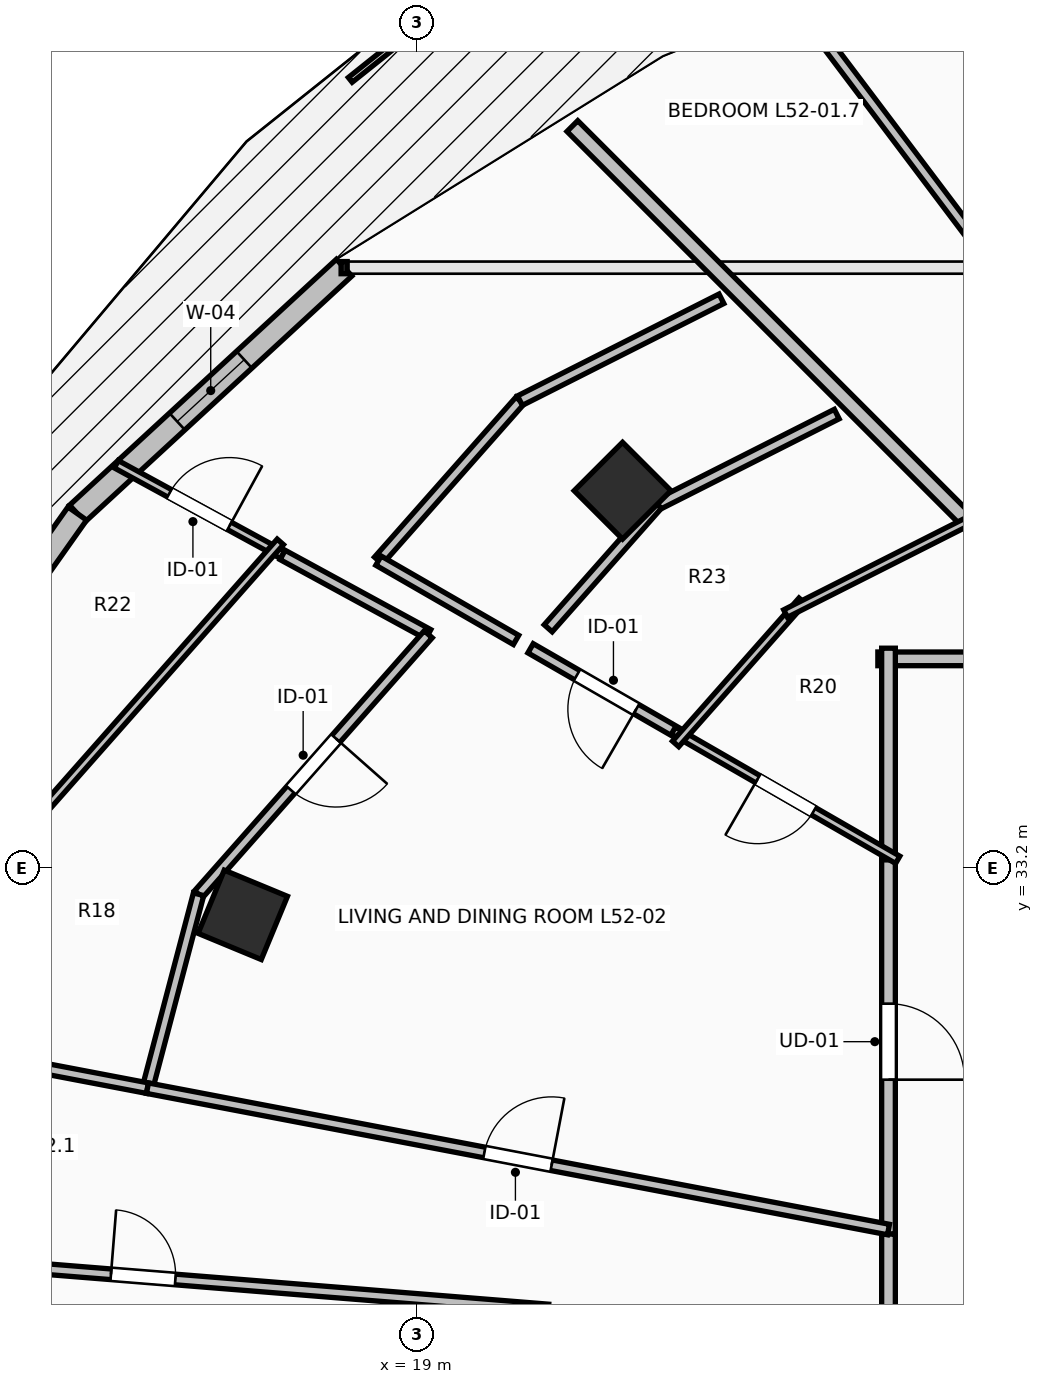
"""IFC4 building model, lengths in metres.
Left out: names, types, materials, properties, quantities, classifications, styles, units other than length and angle.
Written with IfcOpenShell. Run it as: python <this file> out.ifc"""

import sys

from ifc_helpers import new_model, si_unit, direction, frame, frame_2d, origin, origin_2d, place, context, subcontext, project, spatial, rectangle, extrude, element, fill, save


model = new_model("IFC4")
c1 = context("Model", 3, precision=1e-05, world=origin(), true_north=direction((0.0, 1.0)))
c2 = subcontext(c1, "Body", "Model", "MODEL_VIEW")
j1 = project(units=[si_unit("LENGTHUNIT", "METRE"), si_unit("PLANEANGLEUNIT", "RADIAN")], contexts=[c1])
p1 = place(None, origin())
s1 = spatial("IfcSite", under=j1, at=p1, CompositionType="ELEMENT")
p2 = place(p1, origin())
s2 = spatial("IfcBuilding", under=s1, at=p2, CompositionType="ELEMENT")
p3 = place(p2, frame((0.0, 0.0, 193.1)))
s3 = spatial("IfcBuildingStorey", under=s2, at=p3, CompositionType="ELEMENT", Elevation=193.1)
for number, where, z_axis, x_axis in (
    (1, (21.701, 38.162, 0.0), (0.0, 0.0, 1.0), (-0.707, 0.707, 0.0)),
    (2, (16.705, 32.582, 0.0), (0.0, 0.0, 1.0), (-0.924, 0.383, 0.0)),
):
    element("IfcColumn", number, at=place(p3, frame(where, z_axis=z_axis, x_axis=x_axis)), inside=s3, PredefinedType="COLUMN", context=c2, shape_type="SweptSolid", body=[
        extrude(rectangle(XDim=0.9, YDim=0.9, at=origin_2d()), origin(), (0.0, 0.0, 1.0), 3.5),
    ])
p4 = place(p3, frame((18.038, 41.097, 0.0), z_axis=(0.0, 0.0, 1.0), x_axis=(-0.735359993374, -0.677676678177, 0.0)))
e3 = element("IfcWall", 3, at=p4, inside=s3, PredefinedType="STANDARD", context=c2, shape_type="SweptSolid", body=[
    extrude(rectangle(XDim=4.774, YDim=0.3, at=frame_2d((2.387, 0.0))), origin(), (0.0, 0.0, 1.0), 3.24),
])
p5 = place(p4, frame((1.787, 0.0, 0.85)))
e4 = element("IfcOpeningElement", 4, at=p5, cuts=e3, PredefinedType="OPENING", context=c2, shape_type="SweptSolid", body=[
    extrude(rectangle(XDim=1.2, YDim=2.1, at=frame_2d((0.6, 1.05))), frame((0.0, 0.165, 0.0), z_axis=(0.0, -1.0, 0.0), x_axis=(1.0, 0.0, 0.0)), (0.0, 0.0, 1.0), 0.33),
])
p6 = place(p3, frame((14.528, 37.861, 0.0), z_axis=(0.0, 0.0, 1.0), x_axis=(-0.577168747264, -0.81662490605, 0.0)))
e5 = element("IfcWall", 5, at=p6, inside=s3, PredefinedType="STANDARD", context=c2, shape_type="SweptSolid", body=[
    extrude(rectangle(XDim=4.52, YDim=0.3, at=frame_2d((2.26, 0.0))), origin(), (0.0, 0.0, 1.0), 3.24),
])
p7 = place(p6, frame((1.46, 0.0, 0.0)))
e6 = element("IfcOpeningElement", 6, at=p7, cuts=e5, PredefinedType="OPENING", context=c2, shape_type="SweptSolid", body=[
    extrude(rectangle(XDim=1.6, YDim=2.3, at=frame_2d((0.8, 1.15))), frame((0.0, 0.165, 0.0), z_axis=(0.0, -1.0, 0.0), x_axis=(1.0, 0.0, 0.0)), (0.0, 0.0, 1.0), 0.33),
])
p8 = place(p3, frame((25.2, 33.445, 0.0), z_axis=(0.0, 0.0, 1.0), x_axis=(0.0, -1.0, 0.0)))
e7 = element("IfcWall", 7, at=p8, inside=s3, PredefinedType="PARTITIONING", context=c2, shape_type="SweptSolid", body=[
    extrude(rectangle(XDim=5.063, YDim=0.18, at=frame_2d((2.531, 0.0))), origin(), (0.0, 0.0, 1.0), 2.432),
])
p9 = place(p8, frame((2.031, 0.0, 0.0)))
e8 = element("IfcOpeningElement", 8, at=p9, cuts=e7, PredefinedType="OPENING", context=c2, shape_type="SweptSolid", body=[
    extrude(rectangle(XDim=1.0, YDim=2.15, at=frame_2d((0.5, 1.075))), frame((0.0, 0.105, 0.0), z_axis=(0.0, -1.0, 0.0), x_axis=(1.0, 0.0, 0.0)), (0.0, 0.0, 1.0), 0.21),
])
p10 = place(p3, frame((28.105, 35.95, 0.0), z_axis=(0.0, 0.0, 1.0), x_axis=(-1.0, 0.0, 0.0)))
e9 = element("IfcWall", 9, at=p10, inside=s3, PredefinedType="PARTITIONING", context=c2, shape_type="SweptSolid", body=[
    extrude(rectangle(XDim=3.045, YDim=0.18, at=frame_2d((1.522, 0.0))), origin(), (0.0, 0.0, 1.0), 2.432),
])
p11 = place(p3, frame((25.2, 36.09, 0.0), z_axis=(0.0, 0.0, 1.0), x_axis=(0.0, -1.0, 0.0)))
e10 = element("IfcWall", 10, at=p11, inside=s3, PredefinedType="PARTITIONING", context=c2, shape_type="SweptSolid", body=[
    extrude(rectangle(XDim=2.785, YDim=0.18, at=frame_2d((1.393, 0.0))), origin(), (0.0, 0.0, 1.0), 2.432),
])
p12 = place(p3, frame((25.2, 28.382, 0.0), z_axis=(0.0, 0.0, 1.0), x_axis=(0.0, -1.0, 0.0)))
e11 = element("IfcWall", 11, at=p12, inside=s3, PredefinedType="PARTITIONING", context=c2, shape_type="SweptSolid", body=[
    extrude(rectangle(XDim=1.132, YDim=0.18, at=frame_2d((0.566, 0.0))), origin(), (0.0, 0.0, 1.0), 2.432),
])
p13 = place(p3, frame((24.075, 44.46, 0.0), z_axis=(0.0, 0.0, 1.0), x_axis=(0.602185523072, -0.798356183544, 0.0)))
e12 = element("IfcWall", 12, at=p13, inside=s3, PredefinedType="PARTITIONING", context=c2, shape_type="SweptSolid", body=[
    extrude(rectangle(XDim=10.659, YDim=0.14, at=frame_2d((5.33, 0.0))), origin(), (0.0, 0.0, 1.0), 2.432),
])
p14 = place(p3, frame((21.041, 42.959, 0.0), z_axis=(0.0, 0.0, 1.0), x_axis=(0.707106781187, -0.707106781187, 0.0)))
e13 = element("IfcWall", 13, at=p14, inside=s3, PredefinedType="PARTITIONING", context=c2, shape_type="SweptSolid", body=[
    extrude(rectangle(XDim=9.912, YDim=0.2, at=frame_2d((4.956, 0.0))), origin(), (0.0, 0.0, 1.0), 2.432),
])
p15 = place(p3, frame((22.492, 34.936, 0.0), z_axis=(0.0, 0.0, 1.0), x_axis=(-0.866435390844, 0.499289208267, 0.0)))
e14 = element("IfcWall", 14, at=p15, inside=s3, PredefinedType="PARTITIONING", context=c2, shape_type="SweptSolid", body=[
    extrude(rectangle(XDim=2.309, YDim=0.14, at=frame_2d((1.155, 0.0))), origin(), (0.0, 0.0, 1.0), 2.922),
])
p16 = place(p15, frame((0.705, 0.0, 0.0)))
e15 = element("IfcOpeningElement", 15, at=p16, cuts=e14, PredefinedType="OPENING", context=c2, shape_type="SweptSolid", body=[
    extrude(rectangle(XDim=0.9, YDim=2.1, at=frame_2d((0.45, 1.05))), frame((0.0, 0.085, 0.0), z_axis=(0.0, -1.0, 0.0), x_axis=(1.0, 0.0, 0.0)), (0.0, 0.0, 1.0), 0.17),
])
p17 = place(p3, frame((25.321, 33.306, 0.0), z_axis=(0.0, 0.0, 1.0), x_axis=(-0.866517217622, 0.49914718427, 0.0)))
e16 = element("IfcWall", 16, at=p17, inside=s3, PredefinedType="PARTITIONING", context=c2, shape_type="SweptSolid", body=[
    extrude(rectangle(XDim=3.405, YDim=0.11, at=frame_2d((1.703, 0.0))), origin(), (0.0, 0.0, 1.0), 2.922),
])
p18 = place(p17, frame((1.278, 0.0, 0.0)))
e17 = element("IfcOpeningElement", 17, at=p18, cuts=e16, PredefinedType="OPENING", context=c2, shape_type="SweptSolid", body=[
    extrude(rectangle(XDim=0.85, YDim=2.1, at=frame_2d((0.425, 1.05))), frame((0.0, 0.07, 0.0), z_axis=(0.0, -1.0, 0.0), x_axis=(1.0, 0.0, 0.0)), (0.0, 0.0, 1.0), 0.14),
])
p19 = place(p3, frame((15.041, 38.51, 0.0), z_axis=(0.0, 0.0, 1.0), x_axis=(0.877951724479, -0.478749171784, 0.0)))
e18 = element("IfcWall", 18, at=p19, inside=s3, PredefinedType="PARTITIONING", context=c2, shape_type="SweptSolid", body=[
    extrude(rectangle(XDim=2.492, YDim=0.11, at=frame_2d((1.246, 0.0))), origin(), (0.0, 0.0, 1.0), 3.24),
])
p20 = place(p19, frame((0.796, 0.0, 0.0)))
e19 = element("IfcOpeningElement", 19, at=p20, cuts=e18, PredefinedType="OPENING", context=c2, shape_type="SweptSolid", body=[
    extrude(rectangle(XDim=0.9, YDim=2.1, at=frame_2d((0.45, 1.05))), frame((0.0, 0.07, 0.0), z_axis=(0.0, -1.0, 0.0), x_axis=(1.0, 0.0, 0.0)), (0.0, 0.0, 1.0), 0.14),
])
p21 = place(p3, frame((17.229, 37.317, 0.0), z_axis=(0.0, 0.0, 1.0), x_axis=(0.878117834212, -0.47844442649, 0.0)))
e20 = element("IfcWall", 20, at=p21, inside=s3, PredefinedType="PARTITIONING", context=c2, shape_type="SweptSolid", body=[
    extrude(rectangle(XDim=2.182, YDim=0.14, at=frame_2d((1.091, 0.0))), origin(), (0.0, 0.0, 1.0), 3.24),
])
p22 = place(p3, frame((19.145, 36.273, 0.0), z_axis=(0.0, 0.0, 1.0), x_axis=(-0.662162868769, -0.749359950373, 0.0)))
e21 = element("IfcWall", 21, at=p22, inside=s3, PredefinedType="PARTITIONING", context=c2, shape_type="SweptSolid", body=[
    extrude(rectangle(XDim=4.564, YDim=0.14, at=frame_2d((2.282, 0.0))), origin(), (0.0, 0.0, 1.0), 3.24),
])
p23 = place(p22, frame((1.832, 0.0, 0.0)))
e22 = element("IfcOpeningElement", 22, at=p23, cuts=e21, PredefinedType="OPENING", context=c2, shape_type="SweptSolid", body=[
    extrude(rectangle(XDim=0.9, YDim=2.1, at=frame_2d((0.45, 1.05))), frame((0.0, 0.085, 0.0), z_axis=(0.0, -1.0, 0.0), x_axis=(1.0, 0.0, 0.0)), (0.0, 0.0, 1.0), 0.17),
])
p24 = place(p3, frame((16.123, 32.853, 0.0), z_axis=(0.0, 0.0, 1.0), x_axis=(-0.254775717765, -0.967000172512, 0.0)))
e23 = element("IfcWall", 23, at=p24, inside=s3, PredefinedType="PARTITIONING", context=c2, shape_type="SweptSolid", body=[
    extrude(rectangle(XDim=2.638, YDim=0.14, at=frame_2d((1.319, 0.0))), origin(), (0.0, 0.0, 1.0), 3.24),
])
p25 = place(p3, frame((15.451, 30.302, 0.0), z_axis=(0.0, 0.0, 1.0), x_axis=(-0.982295439063, 0.187338384738, 0.0)))
e24 = element("IfcWall", 24, at=p25, inside=s3, PredefinedType="PARTITIONING", context=c2, shape_type="SweptSolid", body=[
    extrude(rectangle(XDim=2.281, YDim=0.14, at=frame_2d((1.14, 0.0))), origin(), (0.0, 0.0, 1.0), 3.24),
])
p26 = place(p3, frame((15.451, 30.302, 0.0), z_axis=(0.0, 0.0, 1.0), x_axis=(0.982284698783, -0.187394691859, 0.0)))
e25 = element("IfcWall", 25, at=p26, inside=s3, PredefinedType="PARTITIONING", context=c2, shape_type="SweptSolid", body=[
    extrude(rectangle(XDim=9.925, YDim=0.14, at=frame_2d((4.962, 0.0))), origin(), (0.0, 0.0, 1.0), 2.774),
])
p27 = place(p26, frame((4.512, 0.0, 0.0)))
e26 = element("IfcOpeningElement", 26, at=p27, cuts=e25, PredefinedType="OPENING", context=c2, shape_type="SweptSolid", body=[
    extrude(rectangle(XDim=0.9, YDim=2.1, at=frame_2d((0.45, 1.05))), frame((0.0, 0.085, 0.0), z_axis=(0.0, -1.0, 0.0), x_axis=(1.0, 0.0, 0.0)), (0.0, 0.0, 1.0), 0.17),
])
p28 = place(p3, frame((22.399, 34.831, 0.0), z_axis=(0.0, 0.0, 1.0), x_axis=(0.662292938072, 0.749244996099, 0.0)))
e27 = element("IfcWall", 27, at=p28, inside=s3, PredefinedType="PARTITIONING", context=c2, shape_type="SweptSolid", body=[
    extrude(rectangle(XDim=2.513, YDim=0.11, at=frame_2d((1.256, 0.0))), origin(), (0.0, 0.0, 1.0), 2.432),
])
p29 = place(p3, frame((23.846, 36.546, 0.0), z_axis=(0.0, 0.0, 1.0), x_axis=(0.892553076465, 0.450942352959, 0.0)))
e28 = element("IfcWall", 28, at=p29, inside=s3, PredefinedType="PARTITIONING", context=c2, shape_type="SweptSolid", body=[
    extrude(rectangle(XDim=2.826, YDim=0.11, at=frame_2d((1.413, 0.0))), origin(), (0.0, 0.0, 1.0), 2.432),
])
p30 = place(p3, frame((13.664, 33.489, 0.0), z_axis=(0.0, 0.0, 1.0), x_axis=(0.662149418065, 0.74937183571, 0.0)))
e29 = element("IfcWall", 29, at=p30, inside=s3, PredefinedType="PARTITIONING", context=c2, shape_type="SweptSolid", body=[
    extrude(rectangle(XDim=5.338, YDim=0.11, at=frame_2d((2.669, 0.0))), origin(), (0.0, 0.0, 1.0), 3.24),
])
p31 = place(p3, frame((10.064, 28.248, 0.0), z_axis=(0.0, 0.0, 1.0), x_axis=(0.996775744362, -0.080237867939, 0.0)))
e30 = element("IfcWall", 30, at=p31, inside=s3, PredefinedType="PARTITIONING", context=c2, shape_type="SweptSolid", body=[
    extrude(rectangle(XDim=10.695, YDim=0.14, at=frame_2d((5.348, 0.0))), origin(), (0.0, 0.0, 1.0), 2.774),
])
p32 = place(p31, frame((4.923, 0.0, 0.0)))
e31 = element("IfcOpeningElement", 31, at=p32, cuts=e30, PredefinedType="OPENING", context=c2, shape_type="SweptSolid", body=[
    extrude(rectangle(XDim=0.85, YDim=2.1, at=frame_2d((0.425, 1.05))), frame((0.0, 0.085, 0.0), z_axis=(0.0, -1.0, 0.0), x_axis=(1.0, 0.0, 0.0)), (0.0, 0.0, 1.0), 0.17),
])
p33 = place(p3, frame((18.49, 37.242, 0.0), z_axis=(0.0, 0.0, 1.0), x_axis=(0.662371376331, 0.749175653513, 0.0)))
e32 = element("IfcWall", 32, at=p33, inside=s3, PredefinedType="PARTITIONING", context=c2, shape_type="SweptSolid", body=[
    extrude(rectangle(XDim=2.81, YDim=0.14, at=frame_2d((1.405, 0.0))), origin(), (0.0, 0.0, 1.0), 3.24),
])
p34 = place(p3, frame((20.351, 39.347, 0.0), z_axis=(0.0, 0.0, 1.0), x_axis=(0.89244587056, 0.451154483653, 0.0)))
e33 = element("IfcWall", 33, at=p34, inside=s3, PredefinedType="PARTITIONING", context=c2, shape_type="SweptSolid", body=[
    extrude(rectangle(XDim=2.97, YDim=0.14, at=frame_2d((1.485, 0.0))), origin(), (0.0, 0.0, 1.0), 3.24),
])
p35 = place(p3, frame((20.3, 36.199, 0.0), z_axis=(0.0, 0.0, 1.0), x_axis=(-0.86645395742, 0.499256987604, 0.0)))
e34 = element("IfcWall", 34, at=p35, inside=s3, PredefinedType="PARTITIONING", context=c2, shape_type="SweptSolid", body=[
    extrude(rectangle(XDim=2.089, YDim=0.14, at=frame_2d((1.044, 0.0))), origin(), (0.0, 0.0, 1.0), 2.774),
])
p36 = place(p3, frame((24.519, 39.17, 0.0), z_axis=(0.0, 0.0, 1.0), x_axis=(-0.89247840077, -0.451090128643, 0.0)))
e35 = element("IfcWall", 35, at=p36, inside=s3, PredefinedType="PARTITIONING", context=c2, shape_type="SweptSolid", body=[
    extrude(rectangle(XDim=2.642, YDim=0.14, at=frame_2d((1.321, 0.0))), origin(), (0.0, 0.0, 1.0), 2.432),
])
p37 = place(p3, frame((22.161, 37.978, 0.0), z_axis=(0.0, 0.0, 1.0), x_axis=(-0.662476802918, -0.749082429106, 0.0)))
e36 = element("IfcWall", 36, at=p37, inside=s3, PredefinedType="PARTITIONING", context=c2, shape_type="SweptSolid", body=[
    extrude(rectangle(XDim=2.171, YDim=0.14, at=frame_2d((1.085, 0.0))), origin(), (0.0, 0.0, 1.0), 2.432),
])
p38 = place(p5, origin())
e37 = element("IfcWindow", 37, at=p38, inside=s3, PartitioningType="SINGLE_PANEL", PredefinedType="WINDOW", context=c2, shape_type="SweptSolid", body=[
    extrude(rectangle(XDim=1.2, YDim=2.1, at=frame_2d((0.6, 1.05))), frame((0.0, 0.03, 0.0), z_axis=(0.0, -1.0, 0.0), x_axis=(1.0, 0.0, 0.0)), (0.0, 0.0, 1.0), 0.06),
])
fill(e4, e37)
p39 = place(p9, origin())
e38 = element("IfcDoor", 38, at=p39, inside=s3, OperationType="SINGLE_SWING_RIGHT", PredefinedType="DOOR", context=c2, shape_type="SweptSolid", body=[
    extrude(rectangle(XDim=1.0, YDim=2.15, at=frame_2d((0.5, 1.075))), frame((0.0, 0.025, 0.0), z_axis=(0.0, -1.0, 0.0), x_axis=(1.0, 0.0, 0.0)), (0.0, 0.0, 1.0), 0.05),
])
fill(e8, e38)
p40 = place(p16, origin())
e39 = element("IfcDoor", 39, at=p40, inside=s3, OperationType="SINGLE_SWING_LEFT", PredefinedType="DOOR", context=c2, shape_type="SweptSolid", body=[
    extrude(rectangle(XDim=0.9, YDim=2.1, at=frame_2d((0.45, 1.05))), frame((0.0, 0.025, 0.0), z_axis=(0.0, -1.0, 0.0), x_axis=(1.0, 0.0, 0.0)), (0.0, 0.0, 1.0), 0.05),
])
fill(e15, e39)
p41 = place(p18, origin())
e40 = element("IfcDoor", 40, at=p41, inside=s3, OperationType="SINGLE_SWING_RIGHT", PredefinedType="DOOR", context=c2, shape_type="SweptSolid", body=[
    extrude(rectangle(XDim=0.85, YDim=2.1, at=frame_2d((0.425, 1.05))), frame((0.0, 0.025, 0.0), z_axis=(0.0, -1.0, 0.0), x_axis=(1.0, 0.0, 0.0)), (0.0, 0.0, 1.0), 0.05),
])
fill(e17, e40)
p42 = place(p20, origin())
e41 = element("IfcDoor", 41, at=p42, inside=s3, OperationType="SINGLE_SWING_RIGHT", PredefinedType="DOOR", context=c2, shape_type="SweptSolid", body=[
    extrude(rectangle(XDim=0.9, YDim=2.1, at=frame_2d((0.45, 1.05))), frame((0.0, 0.025, 0.0), z_axis=(0.0, -1.0, 0.0), x_axis=(1.0, 0.0, 0.0)), (0.0, 0.0, 1.0), 0.05),
])
fill(e19, e41)
p43 = place(p23, origin())
e42 = element("IfcDoor", 42, at=p43, inside=s3, OperationType="SINGLE_SWING_LEFT", PredefinedType="DOOR", context=c2, shape_type="SweptSolid", body=[
    extrude(rectangle(XDim=0.9, YDim=2.1, at=frame_2d((0.45, 1.05))), frame((0.0, 0.025, 0.0), z_axis=(0.0, -1.0, 0.0), x_axis=(1.0, 0.0, 0.0)), (0.0, 0.0, 1.0), 0.05),
])
fill(e22, e42)
p44 = place(p27, origin())
e43 = element("IfcDoor", 43, at=p44, inside=s3, OperationType="SINGLE_SWING_RIGHT", PredefinedType="DOOR", context=c2, shape_type="SweptSolid", body=[
    extrude(rectangle(XDim=0.9, YDim=2.1, at=frame_2d((0.45, 1.05))), frame((0.0, 0.025, 0.0), z_axis=(0.0, -1.0, 0.0), x_axis=(1.0, 0.0, 0.0)), (0.0, 0.0, 1.0), 0.05),
])
fill(e26, e43)
p45 = place(p32, origin())
e44 = element("IfcDoor", 44, at=p45, inside=s3, OperationType="SINGLE_SWING_LEFT", PredefinedType="DOOR", context=c2, shape_type="SweptSolid", body=[
    extrude(rectangle(XDim=0.85, YDim=2.1, at=frame_2d((0.425, 1.05))), frame((0.0, 0.025, 0.0), z_axis=(0.0, -1.0, 0.0), x_axis=(1.0, 0.0, 0.0)), (0.0, 0.0, 1.0), 0.05),
])
fill(e31, e44)
save(model, sys.argv[1])
